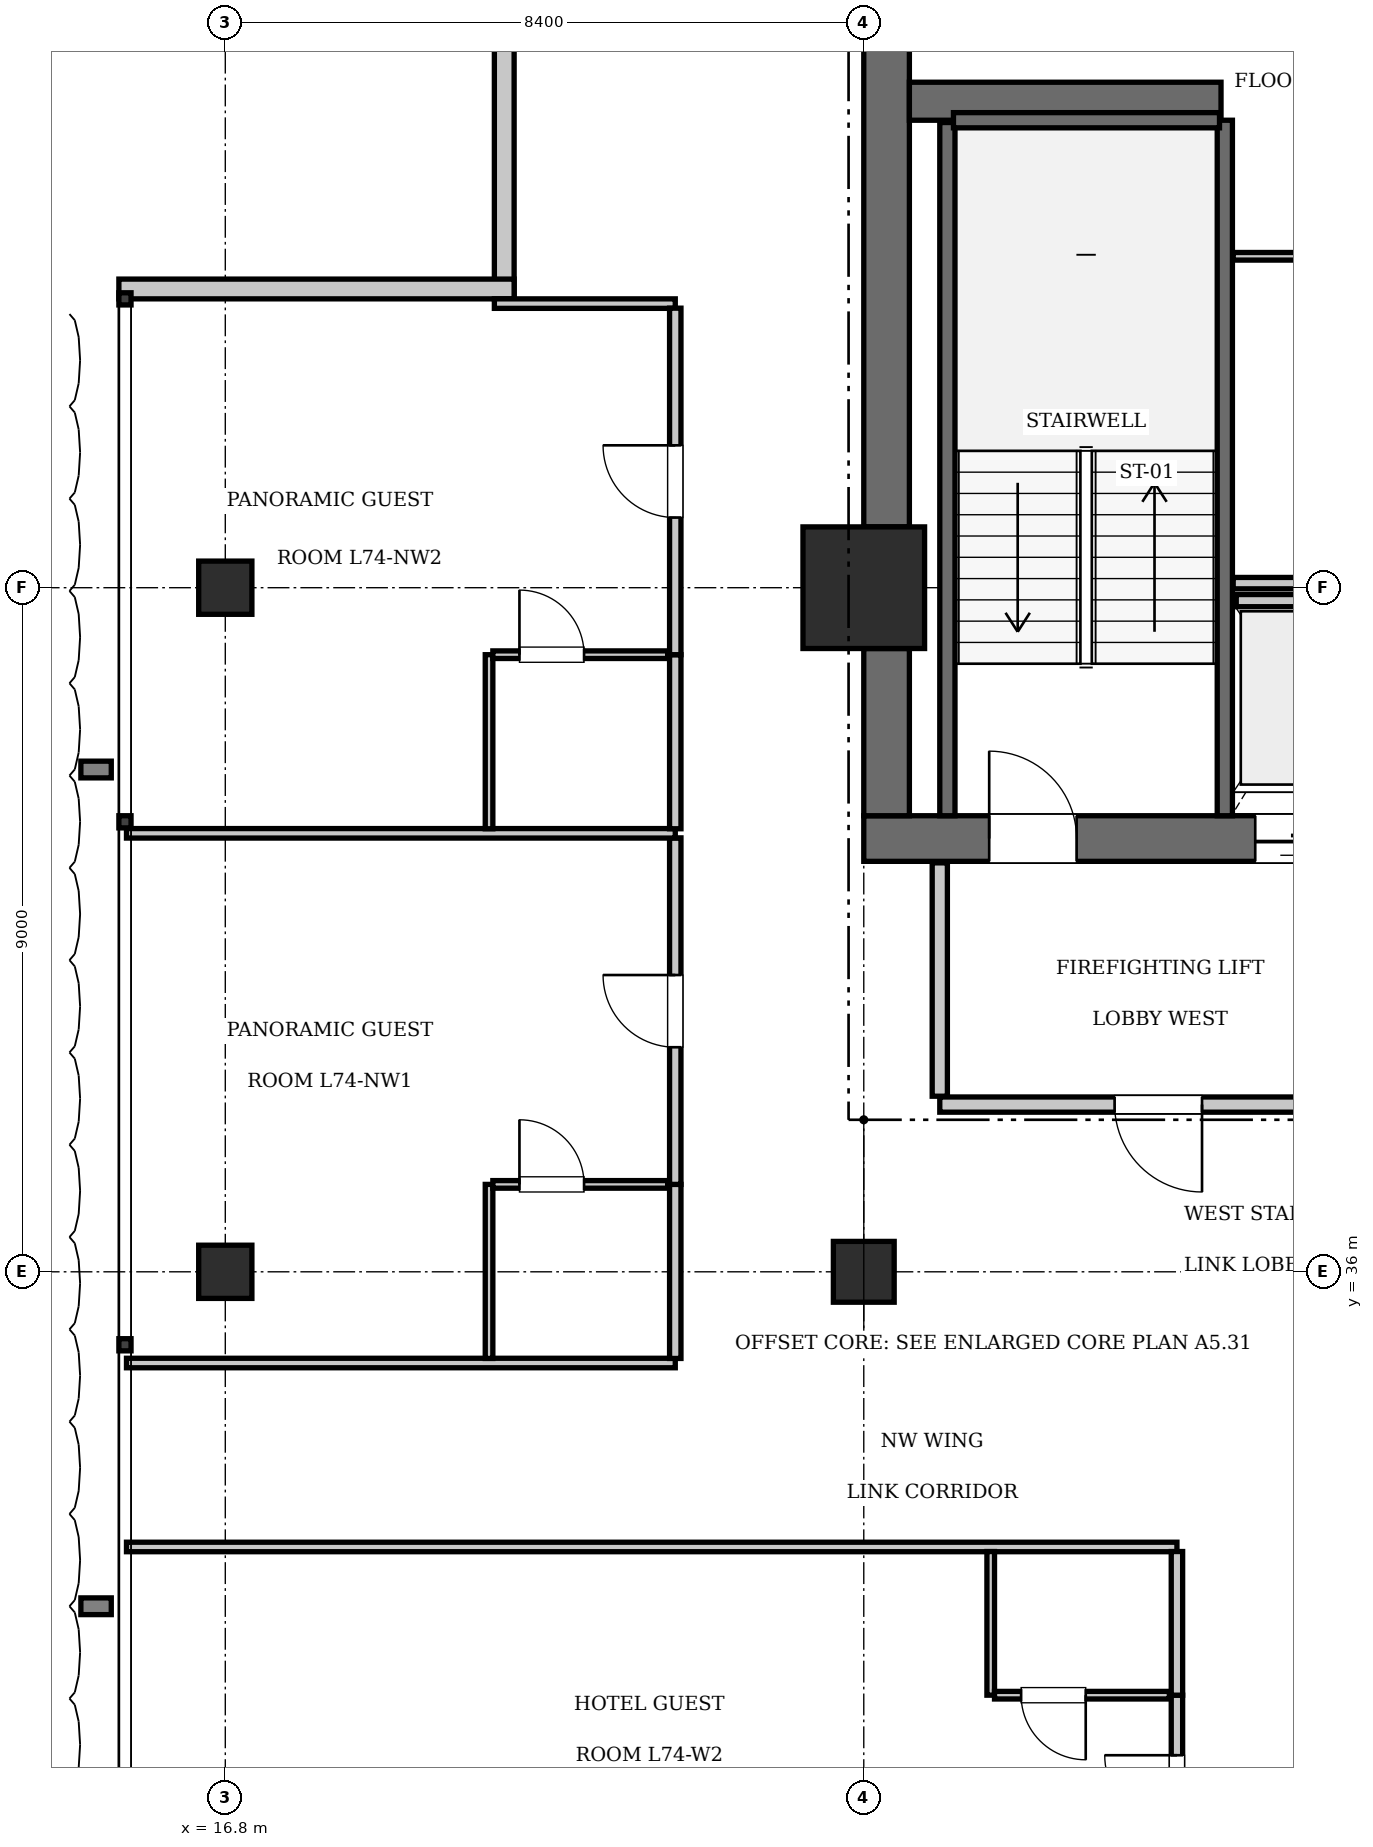
"""IFC4 building model, lengths in metres.
Left out: names, types, materials, properties, quantities, classifications, styles, units other than length and angle.
Written with IfcOpenShell. Run it as: python <this file> out.ifc"""

import sys

from ifc_helpers import new_model, si_unit, direction, frame, frame_2d, origin, origin_2d, place, context, subcontext, project, spatial, rectangle, extrude, element, fill, save


model = new_model("IFC4")
c1 = context("Model", 3, precision=1e-05, world=origin(), true_north=direction((0.0, 1.0)))
c2 = subcontext(c1, "Body", "Model", "MODEL_VIEW")
j1 = project(units=[si_unit("LENGTHUNIT", "METRE"), si_unit("PLANEANGLEUNIT", "RADIAN")], contexts=[c1])
p1 = place(None, origin())
s1 = spatial("IfcSite", under=j1, at=p1, CompositionType="ELEMENT")
p2 = place(p1, origin())
s2 = spatial("IfcBuilding", under=s1, at=p2, CompositionType="ELEMENT")
p3 = place(p2, frame((0.0, 0.0, 301.0)))
s3 = spatial("IfcBuildingStorey", under=s2, at=p3, CompositionType="ELEMENT", Elevation=301.0)
p4 = place(p3, frame((25.2, 45.0, 0.0), z_axis=(0.0, 0.0, 1.0), x_axis=(1.0, 0.0, 0.0)))
e1 = element("IfcColumn", 1, at=p4, inside=s3, PredefinedType="COLUMN", context=c2, shape_type="SweptSolid", body=[
    extrude(rectangle(XDim=1.6, YDim=1.6, at=origin_2d()), origin(), (0.0, 0.0, 1.0), 3.85),
])
p5 = place(p3, frame((25.2, 41.7, 0.0), z_axis=(0.0, 0.0, 1.0), x_axis=(1.0, 0.0, 0.0)))
e2 = element("IfcWall", 2, at=p5, inside=s3, PredefinedType="SHEAR", context=c2, shape_type="SweptSolid", body=[
    extrude(rectangle(XDim=6.8, YDim=0.6, at=frame_2d((3.4, 0.0))), origin(), (0.0, 0.0, 1.0), 3.85),
])
p6 = place(p5, frame((1.65, 0.0, 0.0)))
e3 = element("IfcOpeningElement", 3, at=p6, cuts=e2, PredefinedType="OPENING", context=c2, shape_type="SweptSolid", body=[
    extrude(rectangle(XDim=1.15, YDim=2.15, at=frame_2d((0.575, 1.075))), frame((0.0, 0.31, 0.0), z_axis=(0.0, -1.0, 0.0), x_axis=(1.0, 0.0, 0.0)), (0.0, 0.0, 1.0), 0.62),
])
p7 = place(p5, frame((5.15, 0.0, 0.0)))
e4 = element("IfcOpeningElement", 4, at=p7, cuts=e2, PredefinedType="OPENING", context=c2, shape_type="SweptSolid", body=[
    extrude(rectangle(XDim=1.1, YDim=2.2, at=frame_2d((0.55, 1.1))), frame((0.0, 0.31, 0.0), z_axis=(0.0, -1.0, 0.0), x_axis=(1.0, 0.0, 0.0)), (0.0, 0.0, 1.0), 0.62),
])
p8 = place(p3, frame((25.5, 42.0, 0.0), z_axis=(0.0, 0.0, 1.0), x_axis=(0.0, 1.0, 0.0)))
e5 = element("IfcWall", 5, at=p8, inside=s3, PredefinedType="SHEAR", context=c2, shape_type="SweptSolid", body=[
    extrude(rectangle(XDim=2.2, YDim=0.6, at=frame_2d((1.1, 0.0))), origin(), (0.0, 0.0, 1.0), 3.85),
])
p9 = place(p3, frame((25.5, 45.8, 0.0), z_axis=(0.0, 0.0, 1.0), x_axis=(0.0, 1.0, 0.0)))
e6 = element("IfcWall", 6, at=p9, inside=s3, PredefinedType="SHEAR", context=c2, shape_type="SweptSolid", body=[
    extrude(rectangle(XDim=7.6, YDim=0.6, at=frame_2d((3.8, 0.0))), origin(), (0.0, 0.0, 1.0), 3.85),
])
p10 = place(p3, frame((25.8, 51.4, 0.0), z_axis=(0.0, 0.0, 1.0), x_axis=(1.0, 0.0, 0.0)))
e7 = element("IfcWall", 7, at=p10, inside=s3, PredefinedType="SHEAR", context=c2, shape_type="SweptSolid", body=[
    extrude(rectangle(XDim=4.1, YDim=0.5, at=frame_2d((2.05, 0.0))), origin(), (0.0, 0.0, 1.0), 3.85),
])
p11 = place(p3, frame((25.2, 36.0, 0.0), z_axis=(0.0, 0.0, 1.0), x_axis=(1.0, 0.0, 0.0)))
e8 = element("IfcColumn", 8, at=p11, inside=s3, PredefinedType="COLUMN", context=c2, shape_type="SweptSolid", body=[
    extrude(rectangle(XDim=0.8, YDim=0.8, at=origin_2d()), origin(), (0.0, 0.0, 1.0), 3.85),
])
for number, where, z_axis, x_axis in (
    (9, (16.8, 36.0, 0.0), (0.0, 0.0, 1.0), (1.0, 0.0, 0.0)),
    (10, (16.8, 45.0, 0.0), (0.0, 0.0, 1.0), (1.0, 0.0, 0.0)),
):
    element("IfcColumn", number, at=place(p3, frame(where, z_axis=z_axis, x_axis=x_axis)), inside=s3, PredefinedType="COLUMN", context=c2, shape_type="SweptSolid", body=[
        extrude(rectangle(XDim=0.7, YDim=0.7, at=origin_2d()), origin(), (0.0, 0.0, 1.0), 3.85),
    ])
p12 = place(p3, frame((29.95, 42.0, 0.0), z_axis=(0.0, 0.0, 1.0), x_axis=(0.0, 1.0, 0.0)))
e11 = element("IfcWall", 11, at=p12, inside=s3, PredefinedType="SOLIDWALL", context=c2, shape_type="SweptSolid", body=[
    extrude(rectangle(XDim=9.15, YDim=0.2, at=frame_2d((4.575, 0.0))), origin(), (0.0, 0.0, 1.0), 3.61),
])
p13 = place(p3, frame((26.3, 42.0, 0.0), z_axis=(0.0, 0.0, 1.0), x_axis=(0.0, 1.0, 0.0)))
e12 = element("IfcWall", 12, at=p13, inside=s3, PredefinedType="SOLIDWALL", context=c2, shape_type="SweptSolid", body=[
    extrude(rectangle(XDim=9.12, YDim=0.2, at=frame_2d((4.56, 0.0))), origin(), (0.0, 0.0, 1.0), 3.61),
])
p14 = place(p3, frame((26.38, 51.15, 0.0), z_axis=(0.0, 0.0, 1.0), x_axis=(1.0, 0.0, 0.0)))
e13 = element("IfcWall", 13, at=p14, inside=s3, PredefinedType="SOLIDWALL", context=c2, shape_type="SweptSolid", body=[
    extrude(rectangle(XDim=3.5, YDim=0.2, at=frame_2d((1.75, 0.0))), origin(), (0.0, 0.0, 1.0), 3.61),
])
p15 = place(p3, frame((30.1, 44.83, 0.0), z_axis=(0.0, 0.0, 1.0), x_axis=(1.0, 0.0, 0.0)))
e14 = element("IfcWall", 14, at=p15, inside=s3, PredefinedType="SOLIDWALL", context=c2, shape_type="SweptSolid", body=[
    extrude(rectangle(XDim=1.6, YDim=0.16, at=frame_2d((0.8, 0.0))), origin(), (0.0, 0.0, 1.0), 3.61),
])
p16 = place(p3, frame((20.47, 48.8, 0.0), z_axis=(0.0, 0.0, 1.0), x_axis=(0.0, 1.0, 0.0)))
e15 = element("IfcWall", 15, at=p16, inside=s3, PredefinedType="SOLIDWALL", context=c2, shape_type="SweptSolid", body=[
    extrude(rectangle(XDim=5.2, YDim=0.26, at=frame_2d((2.6, 0.0))), origin(), (0.0, 0.0, 1.0), 3.61),
])
p17 = place(p3, frame((15.4, 48.93, 0.0), z_axis=(0.0, 0.0, 1.0), x_axis=(1.0, 0.0, 0.0)))
e16 = element("IfcWall", 16, at=p17, inside=s3, PredefinedType="SOLIDWALL", context=c2, shape_type="SweptSolid", body=[
    extrude(rectangle(XDim=5.2, YDim=0.26, at=frame_2d((2.6, 0.0))), origin(), (0.0, 0.0, 1.0), 3.61),
])
p18 = place(p3, frame((26.2, 38.2, 0.0), z_axis=(0.0, 0.0, 1.0), x_axis=(1.0, 0.0, 0.0)))
e17 = element("IfcWall", 17, at=p18, inside=s3, PredefinedType="PARTITIONING", context=c2, shape_type="SweptSolid", body=[
    extrude(rectangle(XDim=5.8, YDim=0.2, at=frame_2d((2.9, 0.0))), origin(), (0.0, 0.0, 1.0), 3.61),
])
p19 = place(p18, frame((2.3, 0.0, 0.0)))
e18 = element("IfcOpeningElement", 18, at=p19, cuts=e17, PredefinedType="OPENING", context=c2, shape_type="SweptSolid", body=[
    extrude(rectangle(XDim=1.15, YDim=2.15, at=frame_2d((0.575, 1.075))), frame((0.0, 0.11, 0.0), z_axis=(0.0, -1.0, 0.0), x_axis=(1.0, 0.0, 0.0)), (0.0, 0.0, 1.0), 0.22),
])
p20 = place(p3, frame((26.2, 38.31, 0.0), z_axis=(0.0, 0.0, 1.0), x_axis=(0.0, 1.0, 0.0)))
e19 = element("IfcWall", 19, at=p20, inside=s3, PredefinedType="PARTITIONING", context=c2, shape_type="SweptSolid", body=[
    extrude(rectangle(XDim=3.07, YDim=0.2, at=frame_2d((1.535, 0.0))), origin(), (0.0, 0.0, 1.0), 3.61),
])
p21 = place(p3, frame((30.06, 45.06, 0.0), z_axis=(0.0, 0.0, 1.0), x_axis=(1.0, 0.0, 0.0)))
e20 = element("IfcWall", 20, at=p21, inside=s3, PredefinedType="PARTITIONING", context=c2, shape_type="SweptSolid", body=[
    extrude(rectangle(XDim=3.18, YDim=0.15, at=frame_2d((1.59, 0.0))), origin(), (0.0, 0.0, 1.0), 3.61),
])
p22 = place(p3, frame((30.06, 49.36, 0.0), z_axis=(0.0, 0.0, 1.0), x_axis=(1.0, 0.0, 0.0)))
e21 = element("IfcWall", 21, at=p22, inside=s3, PredefinedType="PARTITIONING", context=c2, shape_type="SweptSolid", body=[
    extrude(rectangle(XDim=3.18, YDim=0.1, at=frame_2d((1.59, 0.0))), origin(), (0.0, 0.0, 1.0), 3.61),
])
p23 = place(p22, frame((1.95, 0.0, 0.0)))
e22 = element("IfcOpeningElement", 22, at=p23, cuts=e21, PredefinedType="OPENING", context=c2, shape_type="SweptSolid", body=[
    extrude(rectangle(XDim=0.8, YDim=2.05, at=frame_2d((0.4, 1.025))), frame((0.0, 0.06, 0.0), z_axis=(0.0, -1.0, 0.0), x_axis=(1.0, 0.0, 0.0)), (0.0, 0.0, 1.0), 0.12),
])
p24 = place(p3, frame((15.5, 32.38, 0.0), z_axis=(0.0, 0.0, 1.0), x_axis=(1.0, 0.0, 0.0)))
e23 = element("IfcWall", 23, at=p24, inside=s3, PredefinedType="PARTITIONING", context=c2, shape_type="SweptSolid", body=[
    extrude(rectangle(XDim=13.82, YDim=0.125, at=frame_2d((6.91, 0.0))), origin(), (0.0, 0.0, 1.0), 3.61),
])
p25 = place(p3, frame((29.32, 27.9, 0.0), z_axis=(0.0, 0.0, 1.0), x_axis=(0.0, 1.0, 0.0)))
e24 = element("IfcWall", 24, at=p25, inside=s3, PredefinedType="PARTITIONING", context=c2, shape_type="SweptSolid", body=[
    extrude(rectangle(XDim=2.53, YDim=0.15, at=frame_2d((1.265, 0.0))), origin(), (0.0, 0.0, 1.0), 3.61),
])
p26 = place(p25, frame((0.79, 0.0, 0.0)))
e25 = element("IfcOpeningElement", 25, at=p26, cuts=e24, PredefinedType="OPENING", context=c2, shape_type="SweptSolid", body=[
    extrude(rectangle(XDim=0.95, YDim=2.15, at=frame_2d((0.475, 1.075))), frame((0.0, 0.085, 0.0), z_axis=(0.0, -1.0, 0.0), x_axis=(1.0, 0.0, 0.0)), (0.0, 0.0, 1.0), 0.17),
])
p27 = place(p3, frame((29.32, 30.43, 0.0), z_axis=(0.0, 0.0, 1.0), x_axis=(0.0, 1.0, 0.0)))
e26 = element("IfcWall", 26, at=p27, inside=s3, PredefinedType="PARTITIONING", context=c2, shape_type="SweptSolid", body=[
    extrude(rectangle(XDim=1.89, YDim=0.15, at=frame_2d((0.945, 0.0))), origin(), (0.0, 0.0, 1.0), 3.61),
])
p28 = place(p3, frame((26.87, 30.43, 0.0), z_axis=(0.0, 0.0, 1.0), x_axis=(0.0, 1.0, 0.0)))
e27 = element("IfcWall", 27, at=p28, inside=s3, PredefinedType="PARTITIONING", context=c2, shape_type="SweptSolid", body=[
    extrude(rectangle(XDim=1.89, YDim=0.1, at=frame_2d((0.945, 0.0))), origin(), (0.0, 0.0, 1.0), 3.61),
])
p29 = place(p3, frame((26.92, 30.43, 0.0), z_axis=(0.0, 0.0, 1.0), x_axis=(1.0, 0.0, 0.0)))
e28 = element("IfcWall", 28, at=p29, inside=s3, PredefinedType="PARTITIONING", context=c2, shape_type="SweptSolid", body=[
    extrude(rectangle(XDim=2.3, YDim=0.1, at=frame_2d((1.15, 0.0))), origin(), (0.0, 0.0, 1.0), 3.61),
])
p30 = place(p29, frame((0.35, 0.0, 0.0)))
e29 = element("IfcOpeningElement", 29, at=p30, cuts=e28, PredefinedType="OPENING", context=c2, shape_type="SweptSolid", body=[
    extrude(rectangle(XDim=0.85, YDim=2.1, at=frame_2d((0.425, 1.05))), frame((0.0, 0.06, 0.0), z_axis=(0.0, -1.0, 0.0), x_axis=(1.0, 0.0, 0.0)), (0.0, 0.0, 1.0), 0.12),
])
p31 = place(p3, frame((15.5, 34.8, 0.0), z_axis=(0.0, 0.0, 1.0), x_axis=(1.0, 0.0, 0.0)))
e30 = element("IfcWall", 30, at=p31, inside=s3, PredefinedType="PARTITIONING", context=c2, shape_type="SweptSolid", body=[
    extrude(rectangle(XDim=7.22, YDim=0.125, at=frame_2d((3.61, 0.0))), origin(), (0.0, 0.0, 1.0), 3.61),
])
p32 = place(p3, frame((20.34, 48.738, 0.0), z_axis=(0.0, 0.0, 1.0), x_axis=(1.0, 0.0, 0.0)))
e31 = element("IfcWall", 31, at=p32, inside=s3, PredefinedType="PARTITIONING", context=c2, shape_type="SweptSolid", body=[
    extrude(rectangle(XDim=2.38, YDim=0.125, at=frame_2d((1.19, 0.0))), origin(), (0.0, 0.0, 1.0), 3.61),
])
p33 = place(p3, frame((22.72, 34.86, 0.0), z_axis=(0.0, 0.0, 1.0), x_axis=(0.0, 1.0, 0.0)))
e32 = element("IfcWall", 32, at=p33, inside=s3, PredefinedType="PARTITIONING", context=c2, shape_type="SweptSolid", body=[
    extrude(rectangle(XDim=2.29, YDim=0.15, at=frame_2d((1.145, 0.0))), origin(), (0.0, 0.0, 1.0), 3.61),
])
p34 = place(p3, frame((22.72, 37.15, 0.0), z_axis=(0.0, 0.0, 1.0), x_axis=(0.0, 1.0, 0.0)))
e33 = element("IfcWall", 33, at=p34, inside=s3, PredefinedType="PARTITIONING", context=c2, shape_type="SweptSolid", body=[
    extrude(rectangle(XDim=4.559, YDim=0.15, at=frame_2d((2.279, 0.0))), origin(), (0.0, 0.0, 1.0), 3.61),
])
p35 = place(p34, frame((1.804, 0.0, 0.0)))
e34 = element("IfcOpeningElement", 34, at=p35, cuts=e33, PredefinedType="OPENING", context=c2, shape_type="SweptSolid", body=[
    extrude(rectangle(XDim=0.95, YDim=2.15, at=frame_2d((0.475, 1.075))), frame((0.0, 0.085, 0.0), z_axis=(0.0, -1.0, 0.0), x_axis=(1.0, 0.0, 0.0)), (0.0, 0.0, 1.0), 0.17),
])
p36 = place(p3, frame((20.27, 34.86, 0.0), z_axis=(0.0, 0.0, 1.0), x_axis=(0.0, 1.0, 0.0)))
e35 = element("IfcWall", 35, at=p36, inside=s3, PredefinedType="PARTITIONING", context=c2, shape_type="SweptSolid", body=[
    extrude(rectangle(XDim=2.29, YDim=0.1, at=frame_2d((1.145, 0.0))), origin(), (0.0, 0.0, 1.0), 3.61),
])
p37 = place(p3, frame((20.32, 37.15, 0.0), z_axis=(0.0, 0.0, 1.0), x_axis=(1.0, 0.0, 0.0)))
e36 = element("IfcWall", 36, at=p37, inside=s3, PredefinedType="PARTITIONING", context=c2, shape_type="SweptSolid", body=[
    extrude(rectangle(XDim=2.3, YDim=0.1, at=frame_2d((1.15, 0.0))), origin(), (0.0, 0.0, 1.0), 3.61),
])
p38 = place(p37, frame((0.35, 0.0, 0.0)))
e37 = element("IfcOpeningElement", 37, at=p38, cuts=e36, PredefinedType="OPENING", context=c2, shape_type="SweptSolid", body=[
    extrude(rectangle(XDim=0.85, YDim=2.1, at=frame_2d((0.425, 1.05))), frame((0.0, 0.06, 0.0), z_axis=(0.0, -1.0, 0.0), x_axis=(1.0, 0.0, 0.0)), (0.0, 0.0, 1.0), 0.12),
])
p39 = place(p3, frame((15.5, 41.769, 0.0), z_axis=(0.0, 0.0, 1.0), x_axis=(1.0, 0.0, 0.0)))
e38 = element("IfcWall", 38, at=p39, inside=s3, PredefinedType="PARTITIONING", context=c2, shape_type="SweptSolid", body=[
    extrude(rectangle(XDim=7.22, YDim=0.125, at=frame_2d((3.61, 0.0))), origin(), (0.0, 0.0, 1.0), 3.61),
])
p40 = place(p3, frame((22.72, 41.829, 0.0), z_axis=(0.0, 0.0, 1.0), x_axis=(0.0, 1.0, 0.0)))
e39 = element("IfcWall", 39, at=p40, inside=s3, PredefinedType="PARTITIONING", context=c2, shape_type="SweptSolid", body=[
    extrude(rectangle(XDim=2.29, YDim=0.15, at=frame_2d((1.145, 0.0))), origin(), (0.0, 0.0, 1.0), 3.61),
])
p41 = place(p3, frame((22.72, 44.119, 0.0), z_axis=(0.0, 0.0, 1.0), x_axis=(0.0, 1.0, 0.0)))
e40 = element("IfcWall", 40, at=p41, inside=s3, PredefinedType="PARTITIONING", context=c2, shape_type="SweptSolid", body=[
    extrude(rectangle(XDim=4.559, YDim=0.15, at=frame_2d((2.279, 0.0))), origin(), (0.0, 0.0, 1.0), 3.61),
])
p42 = place(p41, frame((1.804, 0.0, 0.0)))
e41 = element("IfcOpeningElement", 41, at=p42, cuts=e40, PredefinedType="OPENING", context=c2, shape_type="SweptSolid", body=[
    extrude(rectangle(XDim=0.95, YDim=2.15, at=frame_2d((0.475, 1.075))), frame((0.0, 0.085, 0.0), z_axis=(0.0, -1.0, 0.0), x_axis=(1.0, 0.0, 0.0)), (0.0, 0.0, 1.0), 0.17),
])
p43 = place(p3, frame((20.27, 41.829, 0.0), z_axis=(0.0, 0.0, 1.0), x_axis=(0.0, 1.0, 0.0)))
e42 = element("IfcWall", 42, at=p43, inside=s3, PredefinedType="PARTITIONING", context=c2, shape_type="SweptSolid", body=[
    extrude(rectangle(XDim=2.29, YDim=0.1, at=frame_2d((1.145, 0.0))), origin(), (0.0, 0.0, 1.0), 3.61),
])
p44 = place(p3, frame((20.32, 44.119, 0.0), z_axis=(0.0, 0.0, 1.0), x_axis=(1.0, 0.0, 0.0)))
e43 = element("IfcWall", 43, at=p44, inside=s3, PredefinedType="PARTITIONING", context=c2, shape_type="SweptSolid", body=[
    extrude(rectangle(XDim=2.3, YDim=0.1, at=frame_2d((1.15, 0.0))), origin(), (0.0, 0.0, 1.0), 3.61),
])
p45 = place(p44, frame((0.35, 0.0, 0.0)))
e44 = element("IfcOpeningElement", 44, at=p45, cuts=e43, PredefinedType="OPENING", context=c2, shape_type="SweptSolid", body=[
    extrude(rectangle(XDim=0.85, YDim=2.1, at=frame_2d((0.425, 1.05))), frame((0.0, 0.06, 0.0), z_axis=(0.0, -1.0, 0.0), x_axis=(1.0, 0.0, 0.0)), (0.0, 0.0, 1.0), 0.12),
])
p46 = place(p6, origin())
e45 = element("IfcDoor", 45, at=p46, inside=s3, OperationType="SINGLE_SWING_LEFT", PredefinedType="DOOR", context=c2, shape_type="SweptSolid", body=[
    extrude(rectangle(XDim=1.15, YDim=2.15, at=frame_2d((0.575, 1.075))), frame((0.0, 0.025, 0.0), z_axis=(0.0, -1.0, 0.0), x_axis=(1.0, 0.0, 0.0)), (0.0, 0.0, 1.0), 0.05),
])
fill(e3, e45)
p47 = place(p7, frame((1.1, 0.0, 0.0), z_axis=(0.0, 0.0, 1.0), x_axis=(-1.0, 0.0, 0.0)))
e46 = element("IfcDoor", 46, at=p47, inside=s3, OperationType="SLIDING_TO_LEFT", PredefinedType="DOOR", context=c2, shape_type="SweptSolid", body=[
    extrude(rectangle(XDim=1.1, YDim=2.2, at=frame_2d((0.55, 1.1))), frame((0.0, 0.025, 0.0), z_axis=(0.0, -1.0, 0.0), x_axis=(1.0, 0.0, 0.0)), (0.0, 0.0, 1.0), 0.05),
])
fill(e4, e46)
p48 = place(p19, frame((1.15, 0.0, 0.0), z_axis=(0.0, 0.0, 1.0), x_axis=(-1.0, 0.0, 0.0)))
e47 = element("IfcDoor", 47, at=p48, inside=s3, OperationType="SINGLE_SWING_LEFT", PredefinedType="DOOR", context=c2, shape_type="SweptSolid", body=[
    extrude(rectangle(XDim=1.15, YDim=2.15, at=frame_2d((0.575, 1.075))), frame((0.0, 0.025, 0.0), z_axis=(0.0, -1.0, 0.0), x_axis=(1.0, 0.0, 0.0)), (0.0, 0.0, 1.0), 0.05),
])
fill(e18, e47)
p49 = place(p30, frame((0.85, 0.0, 0.0), z_axis=(0.0, 0.0, 1.0), x_axis=(-1.0, 0.0, 0.0)))
e48 = element("IfcDoor", 48, at=p49, inside=s3, OperationType="SINGLE_SWING_LEFT", PredefinedType="DOOR", context=c2, shape_type="SweptSolid", body=[
    extrude(rectangle(XDim=0.85, YDim=2.1, at=frame_2d((0.425, 1.05))), frame((0.0, 0.025, 0.0), z_axis=(0.0, -1.0, 0.0), x_axis=(1.0, 0.0, 0.0)), (0.0, 0.0, 1.0), 0.05),
])
fill(e29, e48)
p50 = place(p26, origin())
e49 = element("IfcDoor", 49, at=p50, inside=s3, OperationType="SINGLE_SWING_RIGHT", PredefinedType="DOOR", context=c2, shape_type="SweptSolid", body=[
    extrude(rectangle(XDim=0.95, YDim=2.15, at=frame_2d((0.475, 1.075))), frame((0.0, 0.025, 0.0), z_axis=(0.0, -1.0, 0.0), x_axis=(1.0, 0.0, 0.0)), (0.0, 0.0, 1.0), 0.05),
])
fill(e25, e49)
p51 = place(p38, origin())
e50 = element("IfcDoor", 50, at=p51, inside=s3, OperationType="SINGLE_SWING_LEFT", PredefinedType="DOOR", context=c2, shape_type="SweptSolid", body=[
    extrude(rectangle(XDim=0.85, YDim=2.1, at=frame_2d((0.425, 1.05))), frame((0.0, 0.025, 0.0), z_axis=(0.0, -1.0, 0.0), x_axis=(1.0, 0.0, 0.0)), (0.0, 0.0, 1.0), 0.05),
])
fill(e37, e50)
p52 = place(p35, origin())
e51 = element("IfcDoor", 51, at=p52, inside=s3, OperationType="SINGLE_SWING_RIGHT", PredefinedType="DOOR", context=c2, shape_type="SweptSolid", body=[
    extrude(rectangle(XDim=0.95, YDim=2.15, at=frame_2d((0.475, 1.075))), frame((0.0, 0.025, 0.0), z_axis=(0.0, -1.0, 0.0), x_axis=(1.0, 0.0, 0.0)), (0.0, 0.0, 1.0), 0.05),
])
fill(e34, e51)
p53 = place(p45, origin())
e52 = element("IfcDoor", 52, at=p53, inside=s3, OperationType="SINGLE_SWING_LEFT", PredefinedType="DOOR", context=c2, shape_type="SweptSolid", body=[
    extrude(rectangle(XDim=0.85, YDim=2.1, at=frame_2d((0.425, 1.05))), frame((0.0, 0.025, 0.0), z_axis=(0.0, -1.0, 0.0), x_axis=(1.0, 0.0, 0.0)), (0.0, 0.0, 1.0), 0.05),
])
fill(e44, e52)
p54 = place(p42, origin())
e53 = element("IfcDoor", 53, at=p54, inside=s3, OperationType="SINGLE_SWING_RIGHT", PredefinedType="DOOR", context=c2, shape_type="SweptSolid", body=[
    extrude(rectangle(XDim=0.95, YDim=2.15, at=frame_2d((0.475, 1.075))), frame((0.0, 0.025, 0.0), z_axis=(0.0, -1.0, 0.0), x_axis=(1.0, 0.0, 0.0)), (0.0, 0.0, 1.0), 0.05),
])
fill(e41, e53)
save(model, sys.argv[1])
